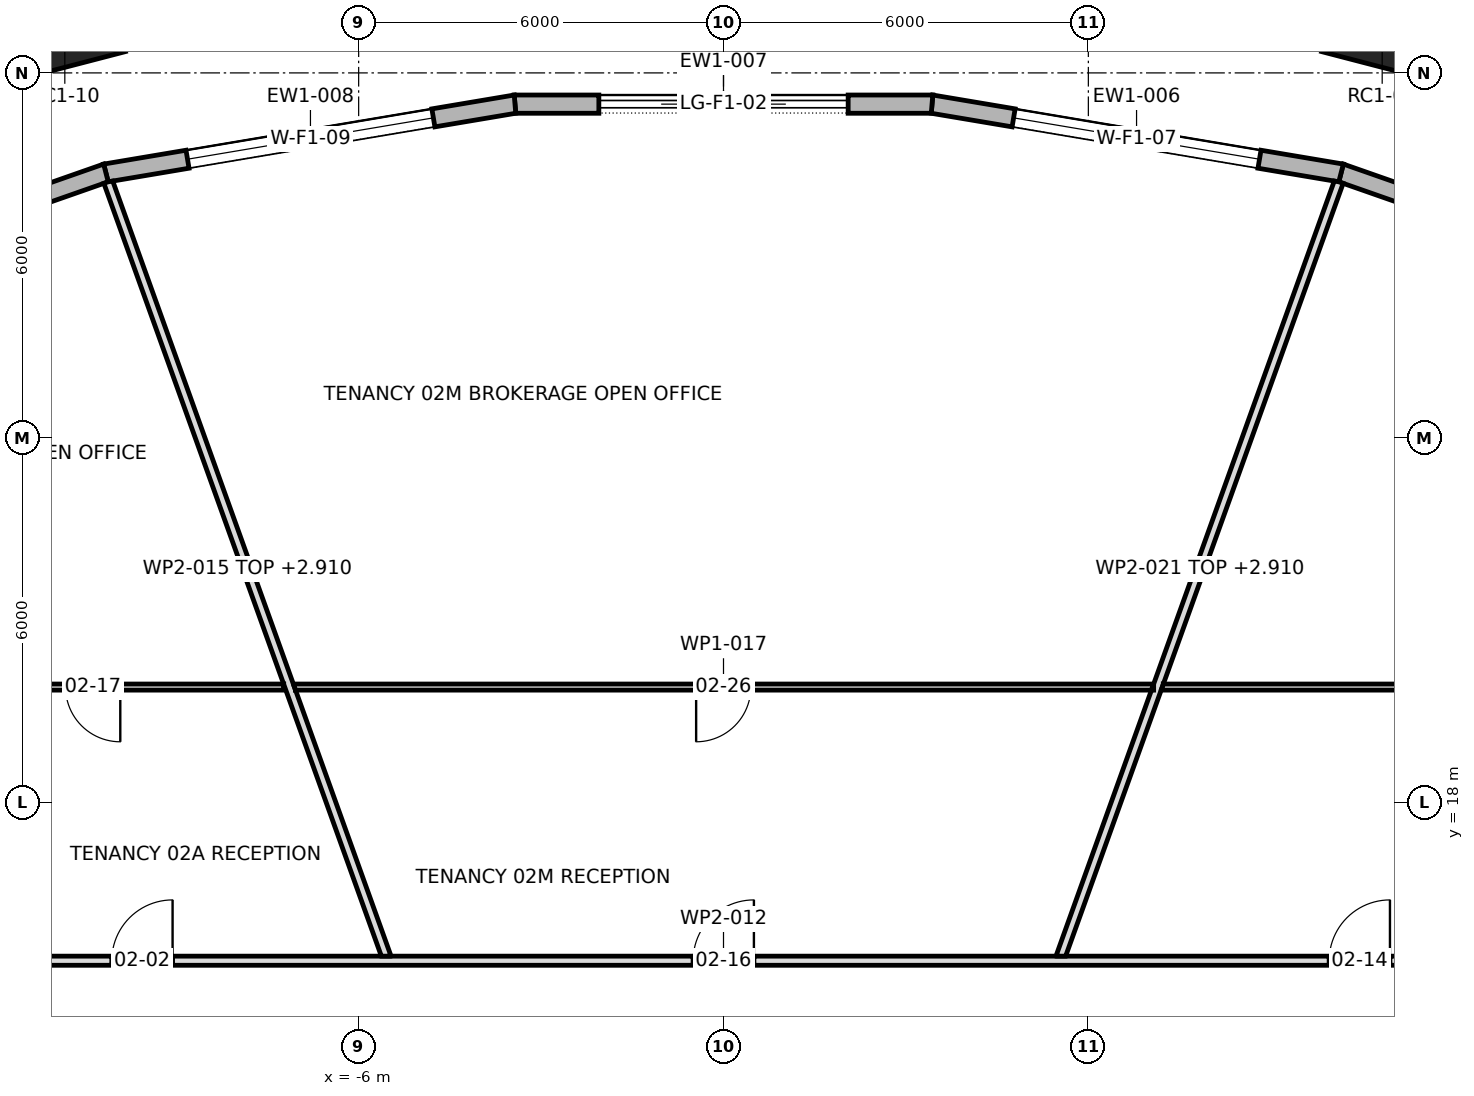
"""IFC4 building model, lengths in metres.
Left out: names, types, materials, properties, quantities, classifications, styles, units other than length and angle.
Written with IfcOpenShell. Run it as: python <this file> out.ifc"""

import sys

from ifc_helpers import new_model, si_unit, direction, frame, frame_2d, origin, origin_2d, place, context, subcontext, project, spatial, polyline, rectangle, outline, extrude, element, fill, save


model = new_model("IFC4")
c1 = context("Model", 3, precision=1e-05, world=origin(), true_north=direction((0.0, 1.0)))
c2 = subcontext(c1, "Body", "Model", "MODEL_VIEW")
j1 = project(units=[si_unit("LENGTHUNIT", "METRE"), si_unit("PLANEANGLEUNIT", "RADIAN")], contexts=[c1])
p1 = place(None, origin())
s1 = spatial("IfcSite", under=j1, at=p1, CompositionType="ELEMENT")
p2 = place(p1, origin())
s2 = spatial("IfcBuilding", under=s1, at=p2, CompositionType="ELEMENT")
p3 = place(p2, frame((0.0, 0.0, 44.5)))
s3 = spatial("IfcBuildingStorey", under=s2, at=p3, CompositionType="ELEMENT", Elevation=44.5)
for number, where, z_axis, x_axis in (
    (1, (10.832, 30.608, 0.0), (0.0, 0.0, 1.0), (-0.968, 0.252, 0.0)),
    (2, (-10.832, 30.608, 0.0), (0.0, 0.0, 1.0), (-0.968, -0.252, 0.0)),
):
    element("IfcColumn", number, at=place(p3, frame(where, z_axis=z_axis, x_axis=x_axis)), inside=s3, PredefinedType="COLUMN", context=c2, shape_type="SweptSolid", body=[
        extrude(rectangle(XDim=1.8, YDim=1.0, at=origin_2d()), origin(), (0.0, 0.0, 1.0), 4.2),
    ])
p4 = place(p3, frame((16.494, 26.135, 0.0), z_axis=(0.0, 0.0, 1.0), x_axis=(-0.943778979427, 0.330577128657, 0.0)))
e3 = element("IfcWall", 3, at=p4, inside=s3, PredefinedType="STANDARD", context=c2, shape_type="SweptSolid", body=[
    extrude(outline(polyline([(-0.013, -0.15), (6.728, -0.15), (6.703, 0.15), (0.013, 0.15), (-0.013, -0.15)])), origin(), (0.0, 0.0, 1.0), 3.9),
])
p5 = place(p4, frame((1.308, 0.0, 0.6)))
e4 = element("IfcOpeningElement", 4, at=p5, cuts=e3, PredefinedType="OPENING", context=c2, shape_type="SweptSolid", body=[
    extrude(rectangle(XDim=4.1, YDim=2.85, at=frame_2d((2.05, 1.425))), frame((0.0, 0.162, 0.0), z_axis=(0.0, -1.0, 0.0), x_axis=(1.0, 0.0, 0.0)), (0.0, 0.0, 1.0), 0.324),
])
p6 = place(p3, frame((10.156, 28.355, 0.0), z_axis=(0.0, 0.0, 1.0), x_axis=(-0.986145179906, 0.165884550659, 0.0)))
e5 = element("IfcWall", 5, at=p6, inside=s3, PredefinedType="STANDARD", context=c2, shape_type="SweptSolid", body=[
    extrude(outline(polyline([(-0.013, -0.15), (6.834, -0.15), (6.809, 0.15), (0.013, 0.15), (-0.013, -0.15)])), origin(), (0.0, 0.0, 1.0), 3.9),
])
p7 = place(p6, frame((1.361, 0.0, 0.6)))
e6 = element("IfcOpeningElement", 6, at=p7, cuts=e5, PredefinedType="OPENING", context=c2, shape_type="SweptSolid", body=[
    extrude(rectangle(XDim=4.1, YDim=2.85, at=frame_2d((2.05, 1.425))), frame((0.0, 0.162, 0.0), z_axis=(0.0, -1.0, 0.0), x_axis=(1.0, 0.0, 0.0)), (0.0, 0.0, 1.0), 0.324),
])
p8 = place(p3, frame((3.429, 29.486, 0.0), z_axis=(0.0, 0.0, 1.0), x_axis=(-1.0, 0.0, 0.0)))
e7 = element("IfcWall", 7, at=p8, inside=s3, PredefinedType="STANDARD", context=c2, shape_type="SweptSolid", body=[
    extrude(outline(polyline([(-0.012, -0.15), (6.871, -0.15), (6.846, 0.15), (0.012, 0.15), (-0.012, -0.15)])), origin(), (0.0, 0.0, 1.0), 3.9),
])
p9 = place(p8, frame((1.379, 0.0, 0.0)))
e8 = element("IfcOpeningElement", 8, at=p9, cuts=e7, PredefinedType="OPENING", context=c2, shape_type="SweptSolid", body=[
    extrude(rectangle(XDim=4.1, YDim=3.45, at=frame_2d((2.05, 1.725))), frame((0.0, 0.162, 0.0), z_axis=(0.0, -1.0, 0.0), x_axis=(1.0, 0.0, 0.0)), (0.0, 0.0, 1.0), 0.324),
])
p10 = place(p3, frame((-3.429, 29.486, 0.0), z_axis=(0.0, 0.0, 1.0), x_axis=(-0.986145179906, -0.165884550659, 0.0)))
e9 = element("IfcWall", 9, at=p10, inside=s3, PredefinedType="STANDARD", context=c2, shape_type="SweptSolid", body=[
    extrude(outline(polyline([(-0.012, -0.15), (6.834, -0.15), (6.809, 0.15), (0.012, 0.15), (-0.012, -0.15)])), origin(), (0.0, 0.0, 1.0), 3.9),
])
p11 = place(p10, frame((1.361, 0.0, 0.6)))
e10 = element("IfcOpeningElement", 10, at=p11, cuts=e9, PredefinedType="OPENING", context=c2, shape_type="SweptSolid", body=[
    extrude(rectangle(XDim=4.1, YDim=2.85, at=frame_2d((2.05, 1.425))), frame((0.0, 0.162, 0.0), z_axis=(0.0, -1.0, 0.0), x_axis=(1.0, 0.0, 0.0)), (0.0, 0.0, 1.0), 0.324),
])
p12 = place(p3, frame((-10.156, 28.355, 0.0), z_axis=(0.0, 0.0, 1.0), x_axis=(-0.943778979427, -0.330577128657, 0.0)))
e11 = element("IfcWall", 11, at=p12, inside=s3, PredefinedType="STANDARD", context=c2, shape_type="SweptSolid", body=[
    extrude(outline(polyline([(-0.013, -0.15), (6.729, -0.15), (6.702, 0.15), (0.013, 0.15), (-0.013, -0.15)])), origin(), (0.0, 0.0, 1.0), 3.9),
])
p13 = place(p12, frame((1.308, 0.0, 0.6)))
e12 = element("IfcOpeningElement", 12, at=p13, cuts=e11, PredefinedType="OPENING", context=c2, shape_type="SweptSolid", body=[
    extrude(rectangle(XDim=4.1, YDim=2.85, at=frame_2d((2.05, 1.425))), frame((0.0, 0.162, 0.0), z_axis=(0.0, -1.0, 0.0), x_axis=(1.0, 0.0, 0.0)), (0.0, 0.0, 1.0), 0.324),
])
p14 = place(p3, frame((-19.95, 19.9, 0.0), z_axis=(0.0, 0.0, 1.0), x_axis=(1.0, 0.0, 0.0)))
e13 = element("IfcWall", 13, at=p14, inside=s3, PredefinedType="PARTITIONING", context=c2, shape_type="SweptSolid", body=[
    extrude(outline(polyline([(12.718, 0.05), (10.901, 0.05), (9.084, 0.05), (7.267, 0.05), (5.45, 0.05), (3.634, 0.05), (1.817, 0.05), (0.0, 0.05), (0.1, -0.05), (1.903, -0.05), (3.705, -0.05), (5.508, -0.05), (7.31, -0.05), (9.113, -0.05), (10.915, -0.05), (12.718, -0.05), (12.718, 0.05)])), origin(), (0.0, 0.0, 1.0), 3.9),
])
p15 = place(p14, frame((9.13, 0.0, 0.0)))
e14 = element("IfcOpeningElement", 14, at=p15, cuts=e13, PredefinedType="OPENING", context=c2, shape_type="SweptSolid", body=[
    extrude(rectangle(XDim=0.9, YDim=2.1, at=frame_2d((0.45, 1.05))), frame((0.0, 0.062, 0.0), z_axis=(0.0, -1.0, 0.0), x_axis=(1.0, 0.0, 0.0)), (0.0, 0.0, 1.0), 0.124),
])
p16 = place(p3, frame((-15.475, 15.4, 0.0), z_axis=(0.0, 0.0, 1.0), x_axis=(1.0, 0.0, 0.0)))
e15 = element("IfcWall", 15, at=p16, inside=s3, PredefinedType="PARTITIONING", context=c2, shape_type="SweptSolid", body=[
    extrude(outline(polyline([(0.15, -0.075), (2.066, -0.075), (3.981, -0.075), (5.897, -0.075), (7.812, -0.075), (9.728, -0.075), (11.644, -0.075), (13.56, -0.075), (15.475, -0.075), (17.391, -0.075), (19.306, -0.075), (21.222, -0.075), (23.138, -0.075), (25.053, -0.075), (26.969, -0.075), (28.885, -0.075), (30.8, -0.075), (30.95, 0.075), (29.016, 0.075), (27.081, 0.075), (25.147, 0.075), (23.212, 0.075), (21.278, 0.075), (19.344, 0.075), (17.409, 0.075), (15.475, 0.075), (13.541, 0.075), (11.606, 0.075), (9.672, 0.075), (7.738, 0.075), (5.803, 0.075), (3.869, 0.075), (1.935, 0.075), (0.0, 0.075), (0.15, -0.075)])), origin(), (0.0, 0.0, 1.0), 3.9),
])
p17 = place(p16, frame((5.415, 0.0, 0.0)))
e16 = element("IfcOpeningElement", 16, at=p17, cuts=e15, PredefinedType="OPENING", context=c2, shape_type="SweptSolid", body=[
    extrude(rectangle(XDim=1.0, YDim=2.1, at=frame_2d((0.5, 1.05))), frame((0.0, 0.087, 0.0), z_axis=(0.0, -1.0, 0.0), x_axis=(1.0, 0.0, 0.0)), (0.0, 0.0, 1.0), 0.174),
])
p18 = place(p16, frame((25.435, 0.0, 0.0)))
e17 = element("IfcOpeningElement", 17, at=p18, cuts=e15, PredefinedType="OPENING", context=c2, shape_type="SweptSolid", body=[
    extrude(rectangle(XDim=1.0, YDim=2.1, at=frame_2d((0.5, 1.05))), frame((0.0, 0.087, 0.0), z_axis=(0.0, -1.0, 0.0), x_axis=(1.0, 0.0, 0.0)), (0.0, 0.0, 1.0), 0.174),
])
p19 = place(p16, frame((14.975, 0.0, 0.0)))
e18 = element("IfcOpeningElement", 18, at=p19, cuts=e15, PredefinedType="OPENING", context=c2, shape_type="SweptSolid", body=[
    extrude(rectangle(XDim=1.0, YDim=2.1, at=frame_2d((0.5, 1.05))), frame((0.0, 0.087, 0.0), z_axis=(0.0, -1.0, 0.0), x_axis=(1.0, 0.0, 0.0)), (0.0, 0.0, 1.0), 0.174),
])
p20 = place(p3, frame((-10.119, 28.209, 0.0), z_axis=(0.0, 0.0, 1.0), x_axis=(0.337949016046, -0.941164418448, 0.0)))
e19 = element("IfcWall", 19, at=p20, inside=s3, PredefinedType="PARTITIONING", context=c2, shape_type="SweptSolid", body=[
    extrude(outline(polyline([(0.0, -0.075), (1.75, -0.075), (3.5, -0.075), (5.249, -0.075), (6.999, -0.075), (8.749, -0.075), (8.749, -0.074), (8.751, -0.075), (10.335, -0.075), (11.919, -0.075), (13.503, -0.075), (13.555, 0.069), (13.555, 0.069), (13.557, 0.074), (13.557, 0.075), (12.008, 0.075), (10.458, 0.075), (8.909, 0.075), (8.908, 0.073), (8.903, 0.075), (7.125, 0.075), (5.347, 0.075), (3.57, 0.075), (1.792, 0.075), (0.014, 0.075), (0.0, 0.0), (0.0, -0.071), (0.0, -0.075)])), origin(), (0.0, 0.0, 1.0), 2.91),
])
p21 = place(p3, frame((-7.074, 19.9, 0.0), z_axis=(0.0, 0.0, 1.0), x_axis=(1.0, 0.0, 0.0)))
e20 = element("IfcWall", 20, at=p21, inside=s3, PredefinedType="PARTITIONING", context=c2, shape_type="SweptSolid", body=[
    extrude(outline(polyline([(0.036, -0.05), (1.795, -0.05), (3.555, -0.05), (5.314, -0.05), (7.074, -0.05), (8.833, -0.05), (10.593, -0.05), (12.353, -0.05), (14.112, -0.05), (14.148, 0.05), (14.148, 0.05), (12.379, 0.05), (10.611, 0.05), (8.843, 0.05), (7.074, 0.05), (5.305, 0.05), (3.537, 0.05), (1.769, 0.05), (0.0, 0.05), (0.0, 0.05), (0.036, -0.05)])), origin(), (0.0, 0.0, 1.0), 3.9),
])
p22 = place(p21, frame((6.624, 0.0, 0.0)))
e21 = element("IfcOpeningElement", 21, at=p22, cuts=e20, PredefinedType="OPENING", context=c2, shape_type="SweptSolid", body=[
    extrude(rectangle(XDim=0.9, YDim=2.1, at=frame_2d((0.45, 1.05))), frame((0.0, 0.062, 0.0), z_axis=(0.0, -1.0, 0.0), x_axis=(1.0, 0.0, 0.0)), (0.0, 0.0, 1.0), 0.124),
])
p23 = place(p3, frame((5.538, 15.45, 0.0), z_axis=(0.0, 0.0, 1.0), x_axis=(0.337949016046, 0.941164418448, 0.0)))
e22 = element("IfcWall", 22, at=p23, inside=s3, PredefinedType="PARTITIONING", context=c2, shape_type="SweptSolid", body=[
    extrude(outline(polyline([(0.053, -0.075), (1.638, -0.075), (3.222, -0.075), (4.806, -0.075), (4.808, -0.074), (4.808, -0.075), (6.558, -0.075), (8.308, -0.075), (10.057, -0.075), (11.807, -0.075), (13.557, -0.075), (13.557, -0.068), (13.556, 0.0), (13.543, 0.075), (11.785, 0.075), (10.028, 0.075), (8.27, 0.075), (6.512, 0.075), (4.754, 0.075), (4.66, 0.041), (4.648, 0.075), (3.099, 0.075), (1.549, 0.075), (0.0, 0.075), (0.0, 0.074), (0.053, -0.075)])), origin(), (0.0, 0.0, 1.0), 2.91),
])
p24 = place(p3, frame((7.198, 19.9, 0.0), z_axis=(0.0, 0.0, 1.0), x_axis=(1.0, 0.0, 0.0)))
e23 = element("IfcWall", 23, at=p24, inside=s3, PredefinedType="PARTITIONING", context=c2, shape_type="SweptSolid", body=[
    extrude(outline(polyline([(0.0, -0.05), (1.807, -0.05), (3.615, -0.05), (5.422, -0.05), (7.23, -0.05), (9.037, -0.05), (10.844, -0.05), (12.652, -0.05), (12.652, -0.05), (12.752, 0.05), (10.935, 0.05), (9.119, 0.05), (7.302, 0.05), (5.485, 0.05), (3.669, 0.05), (1.852, 0.05), (0.035, 0.05), (0.0, -0.049), (0.0, -0.05)])), origin(), (0.0, 0.0, 1.0), 3.9),
])
p25 = place(p24, frame((5.872, 0.0, 0.0)))
e24 = element("IfcOpeningElement", 24, at=p25, cuts=e23, PredefinedType="OPENING", context=c2, shape_type="SweptSolid", body=[
    extrude(rectangle(XDim=0.9, YDim=2.1, at=frame_2d((0.45, 1.05))), frame((0.0, 0.062, 0.0), z_axis=(0.0, -1.0, 0.0), x_axis=(1.0, 0.0, 0.0)), (0.0, 0.0, 1.0), 0.124),
])
p26 = place(p7, origin())
e25 = element("IfcWindow", 25, at=p26, inside=s3, PartitioningType="TRIPLE_PANEL_VERTICAL", PredefinedType="WINDOW", context=c2, shape_type="SweptSolid", body=[
    extrude(rectangle(XDim=4.1, YDim=2.85, at=frame_2d((2.05, 1.425))), frame((0.0, 0.03, 0.0), z_axis=(0.0, -1.0, 0.0), x_axis=(1.0, 0.0, 0.0)), (0.0, 0.0, 1.0), 0.06),
])
fill(e6, e25)
p27 = place(p9, origin())
e26 = element("IfcDoor", 26, at=p27, inside=s3, OperationType="DOUBLE_DOOR_SLIDING", PredefinedType="DOOR", context=c2, shape_type="SweptSolid", body=[
    extrude(rectangle(XDim=4.1, YDim=3.45, at=frame_2d((2.05, 1.725))), frame((0.0, 0.025, 0.0), z_axis=(0.0, -1.0, 0.0), x_axis=(1.0, 0.0, 0.0)), (0.0, 0.0, 1.0), 0.05),
])
fill(e8, e26)
p28 = place(p11, origin())
e27 = element("IfcWindow", 27, at=p28, inside=s3, PartitioningType="TRIPLE_PANEL_VERTICAL", PredefinedType="WINDOW", context=c2, shape_type="SweptSolid", body=[
    extrude(rectangle(XDim=4.1, YDim=2.85, at=frame_2d((2.05, 1.425))), frame((0.0, 0.03, 0.0), z_axis=(0.0, -1.0, 0.0), x_axis=(1.0, 0.0, 0.0)), (0.0, 0.0, 1.0), 0.06),
])
fill(e10, e27)
p29 = place(p17, origin())
e28 = element("IfcDoor", 28, at=p29, inside=s3, OperationType="SINGLE_SWING_LEFT", PredefinedType="DOOR", context=c2, shape_type="SweptSolid", body=[
    extrude(rectangle(XDim=1.0, YDim=2.1, at=frame_2d((0.5, 1.05))), frame((0.0, 0.025, 0.0), z_axis=(0.0, -1.0, 0.0), x_axis=(1.0, 0.0, 0.0)), (0.0, 0.0, 1.0), 0.05),
])
fill(e16, e28)
p30 = place(p18, origin())
e29 = element("IfcDoor", 29, at=p30, inside=s3, OperationType="SINGLE_SWING_LEFT", PredefinedType="DOOR", context=c2, shape_type="SweptSolid", body=[
    extrude(rectangle(XDim=1.0, YDim=2.1, at=frame_2d((0.5, 1.05))), frame((0.0, 0.025, 0.0), z_axis=(0.0, -1.0, 0.0), x_axis=(1.0, 0.0, 0.0)), (0.0, 0.0, 1.0), 0.05),
])
fill(e17, e29)
p31 = place(p19, origin())
e30 = element("IfcDoor", 30, at=p31, inside=s3, OperationType="SINGLE_SWING_LEFT", PredefinedType="DOOR", context=c2, shape_type="SweptSolid", body=[
    extrude(rectangle(XDim=1.0, YDim=2.1, at=frame_2d((0.5, 1.05))), frame((0.0, 0.025, 0.0), z_axis=(0.0, -1.0, 0.0), x_axis=(1.0, 0.0, 0.0)), (0.0, 0.0, 1.0), 0.05),
])
fill(e18, e30)
p32 = place(p15, frame((0.9, 0.0, 0.0), z_axis=(0.0, 0.0, 1.0), x_axis=(-1.0, 0.0, 0.0)))
e31 = element("IfcDoor", 31, at=p32, inside=s3, OperationType="SINGLE_SWING_RIGHT", PredefinedType="DOOR", context=c2, shape_type="SweptSolid", body=[
    extrude(rectangle(XDim=0.9, YDim=2.1, at=frame_2d((0.45, 1.05))), frame((0.0, 0.025, 0.0), z_axis=(0.0, -1.0, 0.0), x_axis=(1.0, 0.0, 0.0)), (0.0, 0.0, 1.0), 0.05),
])
fill(e14, e31)
p33 = place(p22, frame((0.9, 0.0, 0.0), z_axis=(0.0, 0.0, 1.0), x_axis=(-1.0, 0.0, 0.0)))
e32 = element("IfcDoor", 32, at=p33, inside=s3, OperationType="SINGLE_SWING_LEFT", PredefinedType="DOOR", context=c2, shape_type="SweptSolid", body=[
    extrude(rectangle(XDim=0.9, YDim=2.1, at=frame_2d((0.45, 1.05))), frame((0.0, 0.025, 0.0), z_axis=(0.0, -1.0, 0.0), x_axis=(1.0, 0.0, 0.0)), (0.0, 0.0, 1.0), 0.05),
])
fill(e21, e32)
save(model, sys.argv[1])
